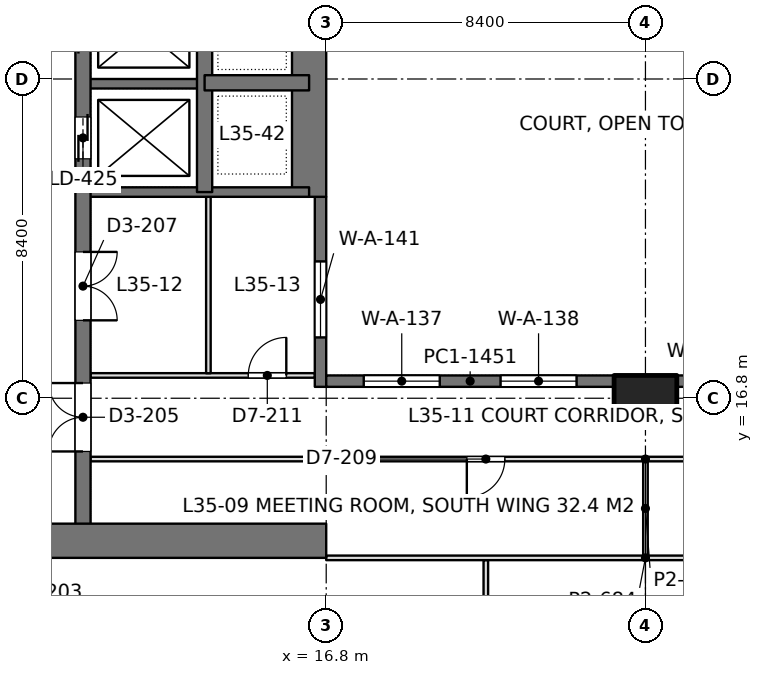
"""IFC4 building model, lengths in metres.
Left out: names, types, materials, properties, quantities, classifications, styles, units other than length and angle.
Written with IfcOpenShell. Run it as: python <this file> out.ifc"""

import sys

from ifc_helpers import new_model, si_unit, direction, frame, frame_2d, origin, origin_2d, place, context, subcontext, project, spatial, rectangle, extrude, element, fill, save


model = new_model("IFC4")
c1 = context("Model", 3, precision=1e-05, world=origin(), true_north=direction((0.0, 1.0)))
c2 = subcontext(c1, "Body", "Model", "MODEL_VIEW")
j1 = project(units=[si_unit("LENGTHUNIT", "METRE"), si_unit("PLANEANGLEUNIT", "RADIAN")], contexts=[c1])
p1 = place(None, origin())
s1 = spatial("IfcSite", under=j1, at=p1, CompositionType="ELEMENT")
p2 = place(p1, origin())
s2 = spatial("IfcBuilding", under=s1, at=p2, CompositionType="ELEMENT")
p3 = place(p2, frame((0.0, 0.0, 155.4)))
s3 = spatial("IfcBuildingStorey", under=s2, at=p3, CompositionType="ELEMENT", Elevation=155.4)
p4 = place(p3, frame((25.2, 16.8, 0.0), z_axis=(0.0, 0.0, 1.0), x_axis=(1.0, 0.0, 0.0)))
e1 = element("IfcColumn", 1, at=p4, inside=s3, PredefinedType="COLUMN", context=c2, shape_type="SweptSolid", body=[
    extrude(rectangle(XDim=1.65, YDim=1.2, at=origin_2d()), origin(), (0.0, 0.0, 1.0), 4.2),
])
p5 = place(p3, frame((-1.2, 13.05, 0.0), z_axis=(0.0, 0.0, 1.0), x_axis=(1.0, 0.0, 0.0)))
e2 = element("IfcWall", 2, at=p5, inside=s3, PredefinedType="SHEAR", context=c2, shape_type="SweptSolid", body=[
    extrude(rectangle(XDim=18.0, YDim=0.9, at=frame_2d((9.0, 0.0))), origin(), (0.0, 0.0, 1.0), 4.2),
])
p6 = place(p5, frame((8.95, 0.0, 0.0)))
e3 = element("IfcOpeningElement", 3, at=p6, cuts=e2, PredefinedType="OPENING", context=c2, shape_type="SweptSolid", body=[
    extrude(rectangle(XDim=1.8, YDim=2.4, at=frame_2d((0.9, 1.2))), frame((0.0, 0.46, 0.0), z_axis=(0.0, -1.0, 0.0), x_axis=(1.0, 0.0, 0.0)), (0.0, 0.0, 1.0), 0.92),
])
p7 = place(p3, frame((16.35, 22.1, 0.0), z_axis=(0.0, 0.0, 1.0), x_axis=(0.0, 1.0, 0.0)))
e4 = element("IfcWall", 4, at=p7, inside=s3, PredefinedType="SHEAR", context=c2, shape_type="SweptSolid", body=[
    extrude(rectangle(XDim=15.25, YDim=0.9, at=frame_2d((7.625, 0.0))), origin(), (0.0, 0.0, 1.0), 4.2),
])
p8 = place(p3, frame((10.4, 13.05, 0.0), z_axis=(0.0, 0.0, 1.0), x_axis=(0.0, 1.0, 0.0)))
e5 = element("IfcWall", 5, at=p8, inside=s3, PredefinedType="SHEAR", context=c2, shape_type="SweptSolid", body=[
    extrude(rectangle(XDim=24.3, YDim=0.4, at=frame_2d((12.15, 0.0))), origin(), (0.0, 0.0, 1.0), 4.2),
])
p9 = place(p8, frame((10.05, 0.0, 0.0)))
e6 = element("IfcOpeningElement", 6, at=p9, cuts=e5, PredefinedType="OPENING", context=c2, shape_type="SweptSolid", body=[
    extrude(rectangle(XDim=1.1, YDim=2.2, at=frame_2d((0.55, 1.1))), frame((0.0, 0.21, 0.0), z_axis=(0.0, -1.0, 0.0), x_axis=(1.0, 0.0, 0.0)), (0.0, 0.0, 1.0), 0.42),
])
p10 = place(p8, frame((12.9, 0.0, 0.0)))
e7 = element("IfcOpeningElement", 7, at=p10, cuts=e5, PredefinedType="OPENING", context=c2, shape_type="SweptSolid", body=[
    extrude(rectangle(XDim=1.1, YDim=2.2, at=frame_2d((0.55, 1.1))), frame((0.0, 0.21, 0.0), z_axis=(0.0, -1.0, 0.0), x_axis=(1.0, 0.0, 0.0)), (0.0, 0.0, 1.0), 0.42),
])
p11 = place(p8, frame((21.45, 0.0, 0.0)))
e8 = element("IfcOpeningElement", 8, at=p11, cuts=e5, PredefinedType="OPENING", context=c2, shape_type="SweptSolid", body=[
    extrude(rectangle(XDim=1.1, YDim=2.2, at=frame_2d((0.55, 1.1))), frame((0.0, 0.21, 0.0), z_axis=(0.0, -1.0, 0.0), x_axis=(1.0, 0.0, 0.0)), (0.0, 0.0, 1.0), 0.42),
])
p12 = place(p8, frame((2.35, 0.0, 0.0)))
e9 = element("IfcOpeningElement", 9, at=p12, cuts=e5, PredefinedType="OPENING", context=c2, shape_type="SweptSolid", body=[
    extrude(rectangle(XDim=1.8, YDim=2.4, at=frame_2d((0.9, 1.2))), frame((0.0, 0.21, 0.0), z_axis=(0.0, -1.0, 0.0), x_axis=(1.0, 0.0, 0.0)), (0.0, 0.0, 1.0), 0.42),
])
p13 = place(p8, frame((5.8, 0.0, 0.0)))
e10 = element("IfcOpeningElement", 10, at=p13, cuts=e5, PredefinedType="OPENING", context=c2, shape_type="SweptSolid", body=[
    extrude(rectangle(XDim=1.8, YDim=2.4, at=frame_2d((0.9, 1.2))), frame((0.0, 0.21, 0.0), z_axis=(0.0, -1.0, 0.0), x_axis=(1.0, 0.0, 0.0)), (0.0, 0.0, 1.0), 0.42),
])
p14 = place(p3, frame((13.6, 22.225, 0.0), z_axis=(0.0, 0.0, 1.0), x_axis=(0.0, 1.0, 0.0)))
e11 = element("IfcWall", 11, at=p14, inside=s3, PredefinedType="SHEAR", context=c2, shape_type="SweptSolid", body=[
    extrude(rectangle(XDim=15.125, YDim=0.4, at=frame_2d((7.562, 0.0))), origin(), (0.0, 0.0, 1.0), 4.2),
])
p15 = place(p3, frame((13.6, 25.1, 0.0), z_axis=(0.0, 0.0, 1.0), x_axis=(1.0, 0.0, 0.0)))
e12 = element("IfcWall", 12, at=p15, inside=s3, PredefinedType="SHEAR", context=c2, shape_type="SweptSolid", body=[
    extrude(rectangle(XDim=2.75, YDim=0.4, at=frame_2d((1.375, 0.0))), origin(), (0.0, 0.0, 1.0), 4.2),
])
p16 = place(p3, frame((10.4, 22.225, 0.0), z_axis=(0.0, 0.0, 1.0), x_axis=(1.0, 0.0, 0.0)))
e13 = element("IfcWall", 13, at=p16, inside=s3, PredefinedType="SHEAR", context=c2, shape_type="SweptSolid", body=[
    extrude(rectangle(XDim=5.95, YDim=0.25, at=frame_2d((2.975, 0.0))), origin(), (0.0, 0.0, 1.0), 4.2),
])
p17 = place(p3, frame((10.4, 25.075, 0.0), z_axis=(0.0, 0.0, 1.0), x_axis=(1.0, 0.0, 0.0)))
e14 = element("IfcWall", 14, at=p17, inside=s3, PredefinedType="SHEAR", context=c2, shape_type="SweptSolid", body=[
    extrude(rectangle(XDim=3.2, YDim=0.25, at=frame_2d((1.6, 0.0))), origin(), (0.0, 0.0, 1.0), 4.2),
])
p18 = place(p3, frame((16.65, 17.1, 0.0), z_axis=(0.0, 0.0, 1.0), x_axis=(0.0, 1.0, 0.0)))
e15 = element("IfcWall", 15, at=p18, inside=s3, PredefinedType="SOLIDWALL", context=c2, shape_type="SweptSolid", body=[
    extrude(rectangle(XDim=5.0, YDim=0.3, at=frame_2d((2.5, 0.0))), origin(), (0.0, 0.0, 1.0), 4.05),
])
p19 = place(p18, frame((1.3, 0.0, 0.1)))
e16 = element("IfcOpeningElement", 16, at=p19, cuts=e15, PredefinedType="OPENING", context=c2, shape_type="SweptSolid", body=[
    extrude(rectangle(XDim=2.0, YDim=3.0, at=frame_2d((1.0, 1.5))), frame((0.0, 0.16, 0.0), z_axis=(0.0, -1.0, 0.0), x_axis=(1.0, 0.0, 0.0)), (0.0, 0.0, 1.0), 0.32),
])
p20 = place(p3, frame((16.8, 17.25, 0.0), z_axis=(0.0, 0.0, 1.0), x_axis=(1.0, 0.0, 0.0)))
e17 = element("IfcWall", 17, at=p20, inside=s3, PredefinedType="SOLIDWALL", context=c2, shape_type="SweptSolid", body=[
    extrude(rectangle(XDim=7.575, YDim=0.3, at=frame_2d((3.788, 0.0))), origin(), (0.0, 0.0, 1.0), 4.05),
])
p21 = place(p20, frame((0.988, 0.0, 0.1)))
e18 = element("IfcOpeningElement", 18, at=p21, cuts=e17, PredefinedType="OPENING", context=c2, shape_type="SweptSolid", body=[
    extrude(rectangle(XDim=2.0, YDim=3.0, at=frame_2d((1.0, 1.5))), frame((0.0, 0.16, 0.0), z_axis=(0.0, -1.0, 0.0), x_axis=(1.0, 0.0, 0.0)), (0.0, 0.0, 1.0), 0.32),
])
p22 = place(p20, frame((4.587, 0.0, 0.1)))
e19 = element("IfcOpeningElement", 19, at=p22, cuts=e17, PredefinedType="OPENING", context=c2, shape_type="SweptSolid", body=[
    extrude(rectangle(XDim=2.0, YDim=3.0, at=frame_2d((1.0, 1.5))), frame((0.0, 0.16, 0.0), z_axis=(0.0, -1.0, 0.0), x_axis=(1.0, 0.0, 0.0)), (0.0, 0.0, 1.0), 0.32),
])
p23 = place(p3, frame((26.025, 17.25, 0.0), z_axis=(0.0, 0.0, 1.0), x_axis=(1.0, 0.0, 0.0)))
e20 = element("IfcWall", 20, at=p23, inside=s3, PredefinedType="SOLIDWALL", context=c2, shape_type="SweptSolid", body=[
    extrude(rectangle(XDim=7.575, YDim=0.3, at=frame_2d((3.788, 0.0))), origin(), (0.0, 0.0, 1.0), 4.05),
])
p24 = place(p23, frame((0.587, 0.0, 0.1)))
e21 = element("IfcOpeningElement", 21, at=p24, cuts=e20, PredefinedType="OPENING", context=c2, shape_type="SweptSolid", body=[
    extrude(rectangle(XDim=2.0, YDim=3.0, at=frame_2d((1.0, 1.5))), frame((0.0, 0.16, 0.0), z_axis=(0.0, -1.0, 0.0), x_axis=(1.0, 0.0, 0.0)), (0.0, 0.0, 1.0), 0.32),
])
p25 = place(p23, frame((4.188, 0.0, 0.1)))
e22 = element("IfcOpeningElement", 22, at=p25, cuts=e20, PredefinedType="OPENING", context=c2, shape_type="SweptSolid", body=[
    extrude(rectangle(XDim=2.0, YDim=3.0, at=frame_2d((1.0, 1.5))), frame((0.0, 0.16, 0.0), z_axis=(0.0, -1.0, 0.0), x_axis=(1.0, 0.0, 0.0)), (0.0, 0.0, 1.0), 0.32),
])
p26 = place(p3, frame((10.598, 17.4, 0.0), z_axis=(0.0, 0.0, 1.0), x_axis=(1.0, 0.0, 0.0)))
e23 = element("IfcWall", 23, at=p26, inside=s3, PredefinedType="PARTITIONING", context=c2, shape_type="SweptSolid", body=[
    extrude(rectangle(XDim=5.904, YDim=0.12, at=frame_2d((2.952, 0.0))), origin(), (0.0, 0.0, 1.0), 3.55),
])
p27 = place(p26, frame((4.152, 0.0, 0.0)))
e24 = element("IfcOpeningElement", 24, at=p27, cuts=e23, PredefinedType="OPENING", context=c2, shape_type="SweptSolid", body=[
    extrude(rectangle(XDim=1.0, YDim=2.4, at=frame_2d((0.5, 1.2))), frame((0.0, 0.07, 0.0), z_axis=(0.0, -1.0, 0.0), x_axis=(1.0, 0.0, 0.0)), (0.0, 0.0, 1.0), 0.14),
])
p28 = place(p3, frame((13.7, 17.458, 0.0), z_axis=(0.0, 0.0, 1.0), x_axis=(0.0, 1.0, 0.0)))
e25 = element("IfcWall", 25, at=p28, inside=s3, PredefinedType="PARTITIONING", context=c2, shape_type="SweptSolid", body=[
    extrude(rectangle(XDim=4.644, YDim=0.12, at=frame_2d((2.322, 0.0))), origin(), (0.0, 0.0, 1.0), 3.6),
])
p29 = place(p3, frame((21.0, 6.298, 0.0), z_axis=(0.0, 0.0, 1.0), x_axis=(0.0, 1.0, 0.0)))
e26 = element("IfcWall", 26, at=p29, inside=s3, PredefinedType="PARTITIONING", context=c2, shape_type="SweptSolid", body=[
    extrude(rectangle(XDim=6.244, YDim=0.12, at=frame_2d((3.122, 0.0))), origin(), (0.0, 0.0, 1.0), 3.55),
])
p30 = place(p3, frame((10.598, 15.2, 0.0), z_axis=(0.0, 0.0, 1.0), x_axis=(1.0, 0.0, 0.0)))
e27 = element("IfcWall", 27, at=p30, inside=s3, PredefinedType="PARTITIONING", context=c2, shape_type="SweptSolid", body=[
    extrude(rectangle(XDim=6.204, YDim=0.12, at=frame_2d((3.102, 0.0))), origin(), (0.0, 0.0, 1.0), 3.55),
])
p31 = place(p3, frame((25.2, 12.658, 0.0), z_axis=(0.0, 0.0, 1.0), x_axis=(0.0, 1.0, 0.0)))
e28 = element("IfcWall", 28, at=p31, inside=s3, PredefinedType="PARTITIONING", context=c2, shape_type="SweptSolid", body=[
    extrude(rectangle(XDim=2.484, YDim=0.12, at=frame_2d((1.242, 0.0))), origin(), (0.0, 0.0, 1.0), 3.55),
])
p32 = place(p3, frame((16.798, 15.2, 0.0), z_axis=(0.0, 0.0, 1.0), x_axis=(1.0, 0.0, 0.0)))
e29 = element("IfcWall", 29, at=p32, inside=s3, PredefinedType="PARTITIONING", context=c2, shape_type="SweptSolid", body=[
    extrude(rectangle(XDim=16.804, YDim=0.12, at=frame_2d((8.402, 0.0))), origin(), (0.0, 0.0, 1.0), 3.55),
])
p33 = place(p32, frame((3.702, 0.0, 0.0)))
e30 = element("IfcOpeningElement", 30, at=p33, cuts=e29, PredefinedType="OPENING", context=c2, shape_type="SweptSolid", body=[
    extrude(rectangle(XDim=1.0, YDim=2.4, at=frame_2d((0.5, 1.2))), frame((0.0, 0.07, 0.0), z_axis=(0.0, -1.0, 0.0), x_axis=(1.0, 0.0, 0.0)), (0.0, 0.0, 1.0), 0.14),
])
p34 = place(p32, frame((12.102, 0.0, 0.0)))
e31 = element("IfcOpeningElement", 31, at=p34, cuts=e29, PredefinedType="OPENING", context=c2, shape_type="SweptSolid", body=[
    extrude(rectangle(XDim=1.0, YDim=2.4, at=frame_2d((0.5, 1.2))), frame((0.0, 0.07, 0.0), z_axis=(0.0, -1.0, 0.0), x_axis=(1.0, 0.0, 0.0)), (0.0, 0.0, 1.0), 0.14),
])
p35 = place(p3, frame((16.8, 12.6, 0.0), z_axis=(0.0, 0.0, 1.0), x_axis=(1.0, 0.0, 0.0)))
e32 = element("IfcWall", 32, at=p35, inside=s3, PredefinedType="PARTITIONING", context=c2, shape_type="SweptSolid", body=[
    extrude(rectangle(XDim=16.8, YDim=0.12, at=frame_2d((8.4, 0.0))), origin(), (0.0, 0.0, 1.0), 3.55),
])
p36 = place(p19, origin())
e33 = element("IfcWindow", 33, at=p36, inside=s3, PartitioningType="SINGLE_PANEL", PredefinedType="WINDOW", context=c2, shape_type="SweptSolid", body=[
    extrude(rectangle(XDim=2.0, YDim=3.0, at=frame_2d((1.0, 1.5))), frame((0.0, 0.03, 0.0), z_axis=(0.0, -1.0, 0.0), x_axis=(1.0, 0.0, 0.0)), (0.0, 0.0, 1.0), 0.06),
])
fill(e16, e33)
p37 = place(p21, origin())
e34 = element("IfcWindow", 34, at=p37, inside=s3, PartitioningType="SINGLE_PANEL", PredefinedType="WINDOW", context=c2, shape_type="SweptSolid", body=[
    extrude(rectangle(XDim=2.0, YDim=3.0, at=frame_2d((1.0, 1.5))), frame((0.0, 0.03, 0.0), z_axis=(0.0, -1.0, 0.0), x_axis=(1.0, 0.0, 0.0)), (0.0, 0.0, 1.0), 0.06),
])
fill(e18, e34)
p38 = place(p22, origin())
e35 = element("IfcWindow", 35, at=p38, inside=s3, PartitioningType="SINGLE_PANEL", PredefinedType="WINDOW", context=c2, shape_type="SweptSolid", body=[
    extrude(rectangle(XDim=2.0, YDim=3.0, at=frame_2d((1.0, 1.5))), frame((0.0, 0.03, 0.0), z_axis=(0.0, -1.0, 0.0), x_axis=(1.0, 0.0, 0.0)), (0.0, 0.0, 1.0), 0.06),
])
fill(e19, e35)
p39 = place(p9, origin())
e36 = element("IfcDoor", 36, at=p39, inside=s3, OperationType="DOUBLE_DOOR_SLIDING", PredefinedType="DOOR", context=c2, shape_type="SweptSolid", body=[
    extrude(rectangle(XDim=1.1, YDim=2.2, at=frame_2d((0.55, 1.1))), frame((0.0, 0.025, 0.0), z_axis=(0.0, -1.0, 0.0), x_axis=(1.0, 0.0, 0.0)), (0.0, 0.0, 1.0), 0.05),
])
fill(e6, e36)
p40 = place(p12, origin())
e37 = element("IfcDoor", 37, at=p40, inside=s3, OperationType="DOUBLE_DOOR_SINGLE_SWING", PredefinedType="DOOR", context=c2, shape_type="SweptSolid", body=[
    extrude(rectangle(XDim=1.8, YDim=2.4, at=frame_2d((0.9, 1.2))), frame((0.0, 0.025, 0.0), z_axis=(0.0, -1.0, 0.0), x_axis=(1.0, 0.0, 0.0)), (0.0, 0.0, 1.0), 0.05),
])
fill(e9, e37)
p41 = place(p13, frame((1.8, 0.0, 0.0), z_axis=(0.0, 0.0, 1.0), x_axis=(-1.0, 0.0, 0.0)))
e38 = element("IfcDoor", 38, at=p41, inside=s3, OperationType="DOUBLE_DOOR_SINGLE_SWING", PredefinedType="DOOR", context=c2, shape_type="SweptSolid", body=[
    extrude(rectangle(XDim=1.8, YDim=2.4, at=frame_2d((0.9, 1.2))), frame((0.0, 0.025, 0.0), z_axis=(0.0, -1.0, 0.0), x_axis=(1.0, 0.0, 0.0)), (0.0, 0.0, 1.0), 0.05),
])
fill(e10, e38)
p42 = place(p27, origin())
e39 = element("IfcDoor", 39, at=p42, inside=s3, OperationType="SINGLE_SWING_RIGHT", PredefinedType="DOOR", context=c2, shape_type="SweptSolid", body=[
    extrude(rectangle(XDim=1.0, YDim=2.4, at=frame_2d((0.5, 1.2))), frame((0.0, 0.025, 0.0), z_axis=(0.0, -1.0, 0.0), x_axis=(1.0, 0.0, 0.0)), (0.0, 0.0, 1.0), 0.05),
])
fill(e24, e39)
p43 = place(p33, frame((1.0, 0.0, 0.0), z_axis=(0.0, 0.0, 1.0), x_axis=(-1.0, 0.0, 0.0)))
e40 = element("IfcDoor", 40, at=p43, inside=s3, OperationType="SINGLE_SWING_RIGHT", PredefinedType="DOOR", context=c2, shape_type="SweptSolid", body=[
    extrude(rectangle(XDim=1.0, YDim=2.4, at=frame_2d((0.5, 1.2))), frame((0.0, 0.025, 0.0), z_axis=(0.0, -1.0, 0.0), x_axis=(1.0, 0.0, 0.0)), (0.0, 0.0, 1.0), 0.05),
])
fill(e30, e40)
save(model, sys.argv[1])
